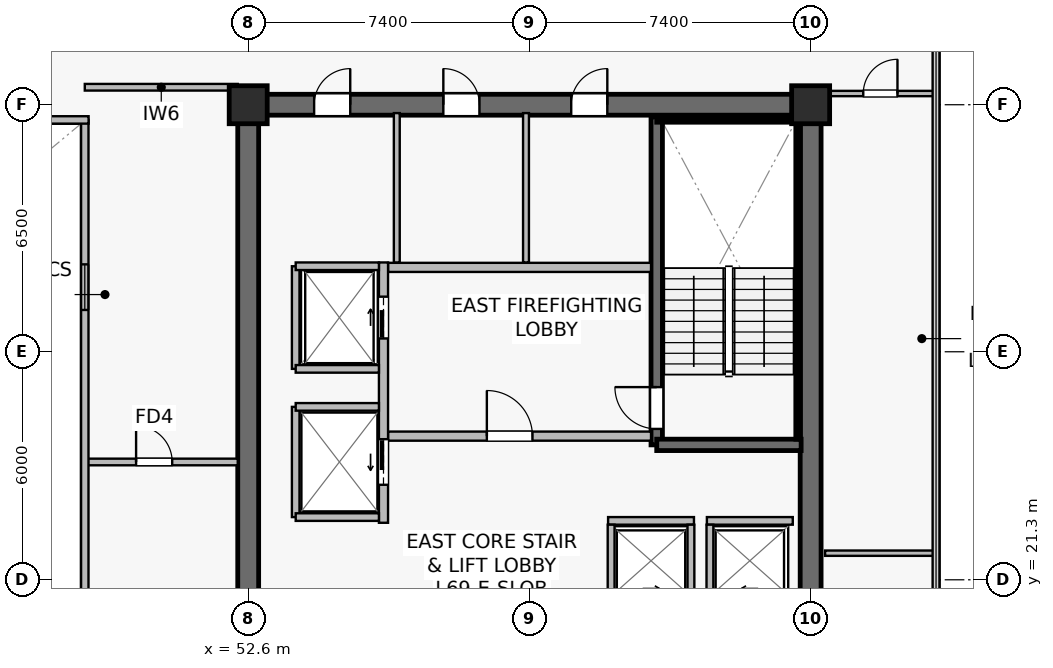
"""IFC4 building model, lengths in metres.
Left out: names, types, materials, properties, quantities, classifications, styles, units other than length and angle.
Written with IfcOpenShell. Run it as: python <this file> out.ifc"""

import sys

from ifc_helpers import new_model, si_unit, direction, frame, frame_2d, origin, origin_2d, place, context, subcontext, project, spatial, rectangle, extrude, source, transform, mapped, element, fill, save


model = new_model("IFC4")
c1 = context("Model", 3, precision=1e-05, world=origin(), true_north=direction((0.0, 1.0)))
c2 = subcontext(c1, "Body", "Model", "MODEL_VIEW")
j1 = project(units=[si_unit("LENGTHUNIT", "METRE"), si_unit("PLANEANGLEUNIT", "RADIAN")], contexts=[c1])
p1 = place(None, origin())
s1 = spatial("IfcSite", under=j1, at=p1, CompositionType="ELEMENT")
p2 = place(p1, origin())
s2 = spatial("IfcBuilding", under=s1, at=p2, CompositionType="ELEMENT")
p3 = place(p2, frame((0.0, 0.0, 287.5)))
s3 = spatial("IfcBuildingStorey", under=s2, at=p3, CompositionType="ELEMENT", Elevation=287.5)
p4 = place(p3, frame((52.325, 33.8, 0.0), z_axis=(0.0, 0.0, 1.0), x_axis=(1.0, 0.0, 0.0)))
e1 = element("IfcWall", 1, at=p4, inside=s3, PredefinedType="SHEAR", context=c2, shape_type="SweptSolid", body=[
    extrude(rectangle(XDim=15.35, YDim=0.55, at=frame_2d((7.675, 0.0))), origin(), (0.0, 0.0, 1.0), 3.8),
])
p5 = place(p4, frame((8.775, 0.0, 0.0)))
e2 = element("IfcOpeningElement", 2, at=p5, cuts=e1, PredefinedType="OPENING", context=c2, shape_type="SweptSolid", body=[
    extrude(rectangle(XDim=0.95, YDim=2.15, at=frame_2d((0.475, 1.075))), frame((0.0, 0.285, 0.0), z_axis=(0.0, -1.0, 0.0), x_axis=(1.0, 0.0, 0.0)), (0.0, 0.0, 1.0), 0.57),
])
p6 = place(p4, frame((5.41, 0.0, 0.0)))
e3 = element("IfcOpeningElement", 3, at=p6, cuts=e1, PredefinedType="OPENING", context=c2, shape_type="SweptSolid", body=[
    extrude(rectangle(XDim=0.95, YDim=2.15, at=frame_2d((0.475, 1.075))), frame((0.0, 0.285, 0.0), z_axis=(0.0, -1.0, 0.0), x_axis=(1.0, 0.0, 0.0)), (0.0, 0.0, 1.0), 0.57),
])
p7 = place(p4, frame((2.01, 0.0, 0.0)))
e4 = element("IfcOpeningElement", 4, at=p7, cuts=e1, PredefinedType="OPENING", context=c2, shape_type="SweptSolid", body=[
    extrude(rectangle(XDim=0.95, YDim=2.15, at=frame_2d((0.475, 1.075))), frame((0.0, 0.285, 0.0), z_axis=(0.0, -1.0, 0.0), x_axis=(1.0, 0.0, 0.0)), (0.0, 0.0, 1.0), 0.57),
])
p8 = place(p3, frame((52.6, 15.075, 0.0), z_axis=(0.0, 0.0, 1.0), x_axis=(0.0, 1.0, 0.0)))
e5 = element("IfcWall", 5, at=p8, inside=s3, PredefinedType="SHEAR", context=c2, shape_type="SweptSolid", body=[
    extrude(rectangle(XDim=18.45, YDim=0.55, at=frame_2d((9.225, 0.0))), origin(), (0.0, 0.0, 1.0), 3.8),
])
p9 = place(p8, frame((3.475, 0.0, 0.0)))
e6 = element("IfcOpeningElement", 6, at=p9, cuts=e5, PredefinedType="OPENING", context=c2, shape_type="SweptSolid", body=[
    extrude(rectangle(XDim=1.42, YDim=2.2, at=frame_2d((0.71, 1.1))), frame((0.0, 0.285, 0.0), z_axis=(0.0, -1.0, 0.0), x_axis=(1.0, 0.0, 0.0)), (0.0, 0.0, 1.0), 0.57),
])
p10 = place(p3, frame((67.4, 15.075, 0.0), z_axis=(0.0, 0.0, 1.0), x_axis=(0.0, 1.0, 0.0)))
e7 = element("IfcWall", 7, at=p10, inside=s3, PredefinedType="SHEAR", context=c2, shape_type="SweptSolid", body=[
    extrude(rectangle(XDim=18.45, YDim=0.55, at=frame_2d((9.225, 0.0))), origin(), (0.0, 0.0, 1.0), 3.8),
])
p11 = place(p3, frame((63.35, 24.85, 0.0), z_axis=(0.0, 0.0, 1.0), x_axis=(0.0, 1.0, 0.0)))
e8 = element("IfcWall", 8, at=p11, inside=s3, PredefinedType="SHEAR", context=c2, shape_type="SweptSolid", body=[
    extrude(rectangle(XDim=8.63, YDim=0.3, at=frame_2d((4.315, 0.0))), origin(), (0.0, 0.0, 1.0), 3.8),
])
p12 = place(p11, frame((0.42, 0.0, 0.0)))
e9 = element("IfcOpeningElement", 9, at=p12, cuts=e8, PredefinedType="OPENING", context=c2, shape_type="SweptSolid", body=[
    extrude(rectangle(XDim=1.1, YDim=2.15, at=frame_2d((0.55, 1.075))), frame((0.0, 0.16, 0.0), z_axis=(0.0, -1.0, 0.0), x_axis=(1.0, 0.0, 0.0)), (0.0, 0.0, 1.0), 0.32),
])
p13 = place(p3, frame((63.35, 24.85, 0.0), z_axis=(0.0, 0.0, 1.0), x_axis=(1.0, 0.0, 0.0)))
e10 = element("IfcWall", 10, at=p13, inside=s3, PredefinedType="SHEAR", context=c2, shape_type="SweptSolid", body=[
    extrude(rectangle(XDim=3.8, YDim=0.3, at=frame_2d((1.9, 0.0))), origin(), (0.0, 0.0, 1.0), 3.8),
])
p14 = place(p3, frame((63.35, 33.4, 0.0), z_axis=(0.0, 0.0, 1.0), x_axis=(1.0, 0.0, 0.0)))
e11 = element("IfcWall", 11, at=p14, inside=s3, PredefinedType="SOLIDWALL", context=c2, shape_type="SweptSolid", body=[
    extrude(rectangle(XDim=3.72, YDim=0.12, at=frame_2d((1.86, 0.0))), origin(), (0.0, 0.0, 1.0), 3.8),
])
p15 = place(p3, frame((67.07, 25.0, 0.0), z_axis=(0.0, 0.0, 1.0), x_axis=(0.0, 1.0, 0.0)))
e12 = element("IfcWall", 12, at=p15, inside=s3, PredefinedType="SOLIDWALL", context=c2, shape_type="SweptSolid", body=[
    extrude(rectangle(XDim=8.32, YDim=0.12, at=frame_2d((4.16, 0.0))), origin(), (0.0, 0.0, 1.0), 3.8),
])
m1 = source(origin(), c2, "Body", "SweptSolid", [
    extrude(rectangle(XDim=1.0, YDim=1.0, at=origin_2d()), origin(), (0.0, 0.0, 1.0), 4.1),
])
for number, where, z_axis, x_axis in (
    (13, (52.6, 33.8, 0.0), (0.0, 0.0, 1.0), (1.0, 0.0, 0.0)),
    (14, (67.4, 33.8, 0.0), (0.0, 0.0, 1.0), (1.0, 0.0, 0.0)),
):
    element("IfcColumn", number, at=place(p3, frame(where, z_axis=z_axis, x_axis=x_axis)), inside=s3, PredefinedType="COLUMN", context=c2, shape_type="MappedRepresentation", body=[
        mapped(m1, transform((0.0, 0.0, 0.0), scale=1.0)),
    ])
p16 = place(p3, frame((56.28, 25.08, 0.0), z_axis=(0.0, 0.0, 1.0), x_axis=(1.0, 0.0, 0.0)))
e15 = element("IfcWall", 15, at=p16, inside=s3, PredefinedType="SOLIDWALL", context=c2, shape_type="SweptSolid", body=[
    extrude(rectangle(XDim=6.92, YDim=0.24, at=frame_2d((3.46, 0.0))), origin(), (0.0, 0.0, 1.0), 3.197),
])
p17 = place(p16, frame((2.6, 0.0, 0.0)))
e16 = element("IfcOpeningElement", 16, at=p17, cuts=e15, PredefinedType="OPENING", context=c2, shape_type="SweptSolid", body=[
    extrude(rectangle(XDim=1.2, YDim=2.16, at=frame_2d((0.6, 1.08))), frame((0.0, 0.13, 0.0), z_axis=(0.0, -1.0, 0.0), x_axis=(1.0, 0.0, 0.0)), (0.0, 0.0, 1.0), 0.26),
])
p18 = place(p3, frame((56.28, 29.52, 0.0), z_axis=(0.0, 0.0, 1.0), x_axis=(1.0, 0.0, 0.0)))
e17 = element("IfcWall", 17, at=p18, inside=s3, PredefinedType="SOLIDWALL", context=c2, shape_type="SweptSolid", body=[
    extrude(rectangle(XDim=6.92, YDim=0.24, at=frame_2d((3.46, 0.0))), origin(), (0.0, 0.0, 1.0), 3.197),
])
p19 = place(p3, frame((56.16, 22.8, 0.0), z_axis=(0.0, 0.0, 1.0), x_axis=(0.0, 1.0, 0.0)))
e18 = element("IfcWall", 18, at=p19, inside=s3, PredefinedType="SOLIDWALL", context=c2, shape_type="SweptSolid", body=[
    extrude(rectangle(XDim=6.85, YDim=0.24, at=frame_2d((3.425, 0.0))), origin(), (0.0, 0.0, 1.0), 2.935),
])
p20 = place(p19, frame((4.85, 0.0, 0.0)))
e19 = element("IfcOpeningElement", 19, at=p20, cuts=e18, PredefinedType="OPENING", context=c2, shape_type="SweptSolid", body=[
    extrude(rectangle(XDim=1.1, YDim=2.22, at=frame_2d((0.55, 1.11))), frame((0.0, 0.13, 0.0), z_axis=(0.0, -1.0, 0.0), x_axis=(1.0, 0.0, 0.0)), (0.0, 0.0, 1.0), 0.26),
])
p21 = place(p19, frame((1.0, 0.0, 0.0)))
e20 = element("IfcOpeningElement", 20, at=p21, cuts=e18, PredefinedType="OPENING", context=c2, shape_type="SweptSolid", body=[
    extrude(rectangle(XDim=1.2, YDim=2.22, at=frame_2d((0.6, 1.11))), frame((0.0, 0.13, 0.0), z_axis=(0.0, -1.0, 0.0), x_axis=(1.0, 0.0, 0.0)), (0.0, 0.0, 1.0), 0.26),
])
p22 = place(p3, frame((64.67, 22.85, 0.0), z_axis=(0.0, 0.0, 1.0), x_axis=(1.0, 0.0, 0.0)))
e21 = element("IfcWall", 21, at=p22, inside=s3, PredefinedType="SOLIDWALL", context=c2, shape_type="SweptSolid", body=[
    extrude(rectangle(XDim=2.26, YDim=0.2, at=frame_2d((1.13, 0.0))), origin(), (0.0, 0.0, 1.0), 3.8),
])
p23 = place(p3, frame((64.75, 20.85, 0.0), z_axis=(0.0, 0.0, 1.0), x_axis=(0.0, 1.0, 0.0)))
e22 = element("IfcWall", 22, at=p23, inside=s3, PredefinedType="SOLIDWALL", context=c2, shape_type="SweptSolid", body=[
    extrude(rectangle(XDim=1.9, YDim=0.18, at=frame_2d((0.95, 0.0))), origin(), (0.0, 0.0, 1.0), 3.8),
])
p24 = place(p3, frame((62.07, 22.85, 0.0), z_axis=(0.0, 0.0, 1.0), x_axis=(1.0, 0.0, 0.0)))
e23 = element("IfcWall", 23, at=p24, inside=s3, PredefinedType="SOLIDWALL", context=c2, shape_type="SweptSolid", body=[
    extrude(rectangle(XDim=2.26, YDim=0.2, at=frame_2d((1.13, 0.0))), origin(), (0.0, 0.0, 1.0), 3.8),
])
for number, where, z_axis, x_axis in (
    (24, (62.15, 20.85, 0.0), (0.0, 0.0, 1.0), (0.0, 1.0, 0.0)),
    (25, (64.25, 20.85, 0.0), (0.0, 0.0, 1.0), (0.0, 1.0, 0.0)),
):
    element("IfcWall", number, at=place(p3, frame(where, z_axis=z_axis, x_axis=x_axis)), inside=s3, PredefinedType="SOLIDWALL", context=c2, shape_type="SweptSolid", body=[
        extrude(rectangle(XDim=1.9, YDim=0.18, at=frame_2d((0.95, 0.0))), origin(), (0.0, 0.0, 1.0), 3.8),
    ])
p25 = place(p3, frame((53.85, 26.85, 0.0), z_axis=(0.0, 0.0, 1.0), x_axis=(0.0, 1.0, 0.0)))
e26 = element("IfcWall", 26, at=p25, inside=s3, PredefinedType="SOLIDWALL", context=c2, shape_type="SweptSolid", body=[
    extrude(rectangle(XDim=2.7, YDim=0.2, at=frame_2d((1.35, 0.0))), origin(), (0.0, 0.0, 1.0), 3.8),
])
p26 = place(p3, frame((53.85, 29.55, 0.0), z_axis=(0.0, 0.0, 1.0), x_axis=(1.0, 0.0, 0.0)))
e27 = element("IfcWall", 27, at=p26, inside=s3, PredefinedType="SOLIDWALL", context=c2, shape_type="SweptSolid", body=[
    extrude(rectangle(XDim=2.19, YDim=0.2, at=frame_2d((1.095, 0.0))), origin(), (0.0, 0.0, 1.0), 3.8),
])
p27 = place(p3, frame((53.85, 26.85, 0.0), z_axis=(0.0, 0.0, 1.0), x_axis=(1.0, 0.0, 0.0)))
e28 = element("IfcWall", 28, at=p27, inside=s3, PredefinedType="SOLIDWALL", context=c2, shape_type="SweptSolid", body=[
    extrude(rectangle(XDim=2.19, YDim=0.2, at=frame_2d((1.095, 0.0))), origin(), (0.0, 0.0, 1.0), 3.197),
])
p28 = place(p3, frame((53.85, 22.95, 0.0), z_axis=(0.0, 0.0, 1.0), x_axis=(0.0, 1.0, 0.0)))
e29 = element("IfcWall", 29, at=p28, inside=s3, PredefinedType="SOLIDWALL", context=c2, shape_type="SweptSolid", body=[
    extrude(rectangle(XDim=2.9, YDim=0.2, at=frame_2d((1.45, 0.0))), origin(), (0.0, 0.0, 1.0), 2.935),
])
for number, where, z_axis, x_axis in (
    (30, (53.85, 25.85, 0.0), (0.0, 0.0, 1.0), (1.0, 0.0, 0.0)),
    (31, (53.85, 22.95, 0.0), (0.0, 0.0, 1.0), (1.0, 0.0, 0.0)),
):
    element("IfcWall", number, at=place(p3, frame(where, z_axis=z_axis, x_axis=x_axis)), inside=s3, PredefinedType="SOLIDWALL", context=c2, shape_type="SweptSolid", body=[
        extrude(rectangle(XDim=2.19, YDim=0.2, at=frame_2d((1.095, 0.0))), origin(), (0.0, 0.0, 1.0), 3.8),
    ])
p29 = place(p3, frame((59.91, 29.65, 0.0), z_axis=(0.0, 0.0, 1.0), x_axis=(0.0, 1.0, 0.0)))
e32 = element("IfcWall", 32, at=p29, inside=s3, PredefinedType="PLUMBINGWALL", context=c2, shape_type="SweptSolid", body=[
    extrude(rectangle(XDim=3.93, YDim=0.155, at=frame_2d((1.965, 0.0))), origin(), (0.0, 0.0, 1.0), 3.197),
])
p30 = place(p3, frame((56.51, 29.65, 0.0), z_axis=(0.0, 0.0, 1.0), x_axis=(0.0, 1.0, 0.0)))
e33 = element("IfcWall", 33, at=p30, inside=s3, PredefinedType="PLUMBINGWALL", context=c2, shape_type="SweptSolid", body=[
    extrude(rectangle(XDim=3.93, YDim=0.155, at=frame_2d((1.965, 0.0))), origin(), (0.0, 0.0, 1.0), 3.8),
])
p31 = place(p3, frame((48.3, 34.26, 0.0), z_axis=(0.0, 0.0, 1.0), x_axis=(1.0, 0.0, 0.0)))
e34 = element("IfcWall", 34, at=p31, inside=s3, PredefinedType="PARTITIONING", context=c2, shape_type="SweptSolid", body=[
    extrude(rectangle(XDim=4.025, YDim=0.175, at=frame_2d((2.012, 0.0))), origin(), (0.0, 0.0, 1.0), 3.535),
])
p32 = place(p3, frame((48.3, 24.4, 0.0), z_axis=(0.0, 0.0, 1.0), x_axis=(1.0, 0.0, 0.0)))
e35 = element("IfcWall", 35, at=p32, inside=s3, PredefinedType="PARTITIONING", context=c2, shape_type="SweptSolid", body=[
    extrude(rectangle(XDim=4.025, YDim=0.175, at=frame_2d((2.012, 0.0))), origin(), (0.0, 0.0, 1.0), 3.8),
])
p33 = place(p32, frame((1.35, 0.0, 0.0)))
e36 = element("IfcOpeningElement", 36, at=p33, cuts=e35, PredefinedType="OPENING", context=c2, shape_type="SweptSolid", body=[
    extrude(rectangle(XDim=0.95, YDim=2.15, at=frame_2d((0.475, 1.075))), frame((0.0, 0.098, 0.0), z_axis=(0.0, -1.0, 0.0), x_axis=(1.0, 0.0, 0.0)), (0.0, 0.0, 1.0), 0.195),
])
p34 = place(p3, frame((48.3, 15.2, 0.0), z_axis=(0.0, 0.0, 1.0), x_axis=(0.0, 1.0, 0.0)))
e37 = element("IfcWall", 37, at=p34, inside=s3, PredefinedType="SOLIDWALL", context=c2, shape_type="SweptSolid", body=[
    extrude(rectangle(XDim=18.2, YDim=0.195, at=frame_2d((9.1, 0.0))), origin(), (0.0, 0.0, 1.0), 3.8),
])
p35 = place(p34, frame((1.8, 0.0, 0.9)))
e38 = element("IfcOpeningElement", 38, at=p35, cuts=e37, PredefinedType="OPENING", context=c2, shape_type="SweptSolid", body=[
    extrude(rectangle(XDim=1.2, YDim=1.35, at=frame_2d((0.6, 0.675))), frame((0.0, 0.107, 0.0), z_axis=(0.0, -1.0, 0.0), x_axis=(1.0, 0.0, 0.0)), (0.0, 0.0, 1.0), 0.215),
])
p36 = place(p34, frame((13.2, 0.0, 0.9)))
e39 = element("IfcOpeningElement", 39, at=p36, cuts=e37, PredefinedType="OPENING", context=c2, shape_type="SweptSolid", body=[
    extrude(rectangle(XDim=1.2, YDim=1.35, at=frame_2d((0.6, 0.675))), frame((0.0, 0.107, 0.0), z_axis=(0.0, -1.0, 0.0), x_axis=(1.0, 0.0, 0.0)), (0.0, 0.0, 1.0), 0.215),
])
p37 = place(p3, frame((26.4, 33.4, 0.0), z_axis=(0.0, 0.0, 1.0), x_axis=(1.0, 0.0, 0.0)))
e40 = element("IfcWall", 40, at=p37, inside=s3, PredefinedType="SOLIDWALL", context=c2, shape_type="SweptSolid", body=[
    extrude(rectangle(XDim=22.0, YDim=0.195, at=frame_2d((11.0, 0.0))), origin(), (0.0, 0.0, 1.0), 3.8),
])
p38 = place(p3, frame((67.78, 22.0, 0.0), z_axis=(0.0, 0.0, 1.0), x_axis=(1.0, 0.0, 0.0)))
e41 = element("IfcWall", 41, at=p38, inside=s3, PredefinedType="PARTITIONING", context=c2, shape_type="SweptSolid", body=[
    extrude(rectangle(XDim=2.91, YDim=0.14, at=frame_2d((1.455, 0.0))), origin(), (0.0, 0.0, 1.0), 3.8),
])
p39 = place(p3, frame((67.78, 34.095, 0.0), z_axis=(0.0, 0.0, 1.0), x_axis=(1.0, 0.0, 0.0)))
e42 = element("IfcWall", 42, at=p39, inside=s3, PredefinedType="PARTITIONING", context=c2, shape_type="SweptSolid", body=[
    extrude(rectangle(XDim=2.91, YDim=0.14, at=frame_2d((1.455, 0.0))), origin(), (0.0, 0.0, 1.0), 3.8),
])
p40 = place(p39, frame((1.005, 0.0, 0.0)))
e43 = element("IfcOpeningElement", 43, at=p40, cuts=e42, PredefinedType="OPENING", context=c2, shape_type="SweptSolid", body=[
    extrude(rectangle(XDim=0.9, YDim=2.1, at=frame_2d((0.45, 1.05))), frame((0.0, 0.08, 0.0), z_axis=(0.0, -1.0, 0.0), x_axis=(1.0, 0.0, 0.0)), (0.0, 0.0, 1.0), 0.16),
])
m2 = source(origin(), c2, "Body", "SweptSolid", [
    extrude(rectangle(XDim=1.2, YDim=1.35, at=frame_2d((0.6, 0.675))), frame((0.0, 0.03, 0.0), z_axis=(0.0, -1.0, 0.0), x_axis=(1.0, 0.0, 0.0)), (0.0, 0.0, 1.0), 0.06),
])
p41 = place(p36, origin())
e44 = element("IfcWindow", 44, at=p41, inside=s3, PartitioningType="SINGLE_PANEL", PredefinedType="WINDOW", context=c2, shape_type="MappedRepresentation", body=[
    mapped(m2, transform((0.0, 0.0, 0.0), scale=1.0)),
])
fill(e39, e44)
m3 = source(origin(), c2, "Body", "SweptSolid", [
    extrude(rectangle(XDim=1.1, YDim=2.15, at=frame_2d((0.55, 1.075))), frame((0.0, 0.025, 0.0), z_axis=(0.0, -1.0, 0.0), x_axis=(1.0, 0.0, 0.0)), (0.0, 0.0, 1.0), 0.05),
])
p42 = place(p12, origin())
e45 = element("IfcDoor", 45, at=p42, inside=s3, OperationType="SINGLE_SWING_RIGHT", PredefinedType="DOOR", context=c2, shape_type="MappedRepresentation", body=[
    mapped(m3, transform((0.0, 0.0, 0.0), scale=1.0)),
])
fill(e9, e45)
m4 = source(origin(), c2, "Body", "SweptSolid", [
    extrude(rectangle(XDim=1.2, YDim=2.16, at=frame_2d((0.6, 1.08))), frame((0.0, 0.025, 0.0), z_axis=(0.0, -1.0, 0.0), x_axis=(1.0, 0.0, 0.0)), (0.0, 0.0, 1.0), 0.05),
])
p43 = place(p17, origin())
e46 = element("IfcDoor", 46, at=p43, inside=s3, OperationType="SINGLE_SWING_LEFT", PredefinedType="DOOR", context=c2, shape_type="MappedRepresentation", body=[
    mapped(m4, transform((0.0, 0.0, 0.0), scale=1.0)),
])
fill(e16, e46)
m5 = source(origin(), c2, "Body", "SweptSolid", [
    extrude(rectangle(XDim=1.1, YDim=2.22, at=frame_2d((0.55, 1.11))), frame((0.0, 0.025, 0.0), z_axis=(0.0, -1.0, 0.0), x_axis=(1.0, 0.0, 0.0)), (0.0, 0.0, 1.0), 0.05),
])
p44 = place(p20, origin())
e47 = element("IfcDoor", 47, at=p44, inside=s3, OperationType="SLIDING_TO_RIGHT", PredefinedType="USERDEFINED", context=c2, shape_type="MappedRepresentation", body=[
    mapped(m5, transform((0.0, 0.0, 0.0), scale=1.0)),
])
fill(e19, e47)
m6 = source(origin(), c2, "Body", "SweptSolid", [
    extrude(rectangle(XDim=1.2, YDim=2.22, at=frame_2d((0.6, 1.11))), frame((0.0, 0.025, 0.0), z_axis=(0.0, -1.0, 0.0), x_axis=(1.0, 0.0, 0.0)), (0.0, 0.0, 1.0), 0.05),
])
p45 = place(p21, origin())
e48 = element("IfcDoor", 48, at=p45, inside=s3, OperationType="SLIDING_TO_LEFT", PredefinedType="USERDEFINED", context=c2, shape_type="MappedRepresentation", body=[
    mapped(m6, transform((0.0, 0.0, 0.0), scale=1.0)),
])
fill(e20, e48)
m7 = source(origin(), c2, "Body", "SweptSolid", [
    extrude(rectangle(XDim=0.95, YDim=2.15, at=frame_2d((0.475, 1.075))), frame((0.0, 0.025, 0.0), z_axis=(0.0, -1.0, 0.0), x_axis=(1.0, 0.0, 0.0)), (0.0, 0.0, 1.0), 0.05),
])
p46 = place(p5, origin())
e49 = element("IfcDoor", 49, at=p46, inside=s3, OperationType="SINGLE_SWING_RIGHT", PredefinedType="DOOR", context=c2, shape_type="MappedRepresentation", body=[
    mapped(m7, transform((0.0, 0.0, 0.0), scale=1.0)),
])
fill(e2, e49)
p47 = place(p6, origin())
e50 = element("IfcDoor", 50, at=p47, inside=s3, OperationType="SINGLE_SWING_LEFT", PredefinedType="DOOR", context=c2, shape_type="MappedRepresentation", body=[
    mapped(m7, transform((0.0, 0.0, 0.0), scale=1.0)),
])
fill(e3, e50)
p48 = place(p7, origin())
e51 = element("IfcDoor", 51, at=p48, inside=s3, OperationType="SINGLE_SWING_RIGHT", PredefinedType="DOOR", context=c2, shape_type="MappedRepresentation", body=[
    mapped(m7, transform((0.0, 0.0, 0.0), scale=1.0)),
])
fill(e4, e51)
p49 = place(p33, origin())
e52 = element("IfcDoor", 52, at=p49, inside=s3, OperationType="SINGLE_SWING_LEFT", PredefinedType="DOOR", context=c2, shape_type="MappedRepresentation", body=[
    mapped(m7, transform((0.0, 0.0, 0.0), scale=1.0)),
])
fill(e36, e52)
m8 = source(origin(), c2, "Body", "SweptSolid", [
    extrude(rectangle(XDim=0.9, YDim=2.1, at=frame_2d((0.45, 1.05))), frame((0.0, 0.025, 0.0), z_axis=(0.0, -1.0, 0.0), x_axis=(1.0, 0.0, 0.0)), (0.0, 0.0, 1.0), 0.05),
])
p50 = place(p40, origin())
e53 = element("IfcDoor", 53, at=p50, inside=s3, OperationType="SINGLE_SWING_RIGHT", PredefinedType="DOOR", context=c2, shape_type="MappedRepresentation", body=[
    mapped(m8, transform((0.0, 0.0, 0.0), scale=1.0)),
])
fill(e43, e53)
save(model, sys.argv[1])
